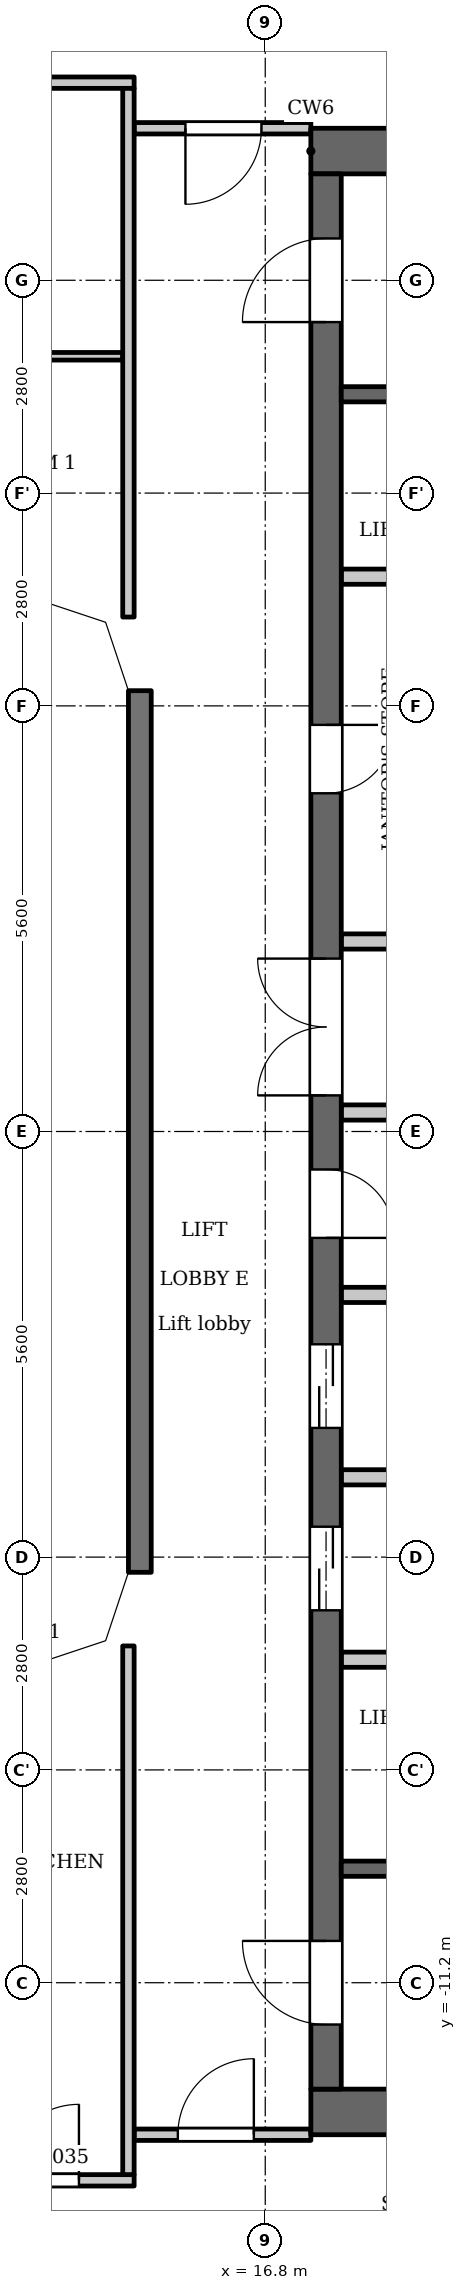
"""IFC4 building model, lengths in metres.
Left out: names, types, materials, properties, quantities, classifications, styles, units other than length and angle.
Written with IfcOpenShell. Run it as: python <this file> out.ifc"""

import sys

from ifc_helpers import new_model, si_unit, direction, frame, frame_2d, origin, place, context, subcontext, project, spatial, polyline, rectangle, outline, extrude, element, fill, save


model = new_model("IFC4")
c1 = context("Model", 3, precision=1e-05, world=origin(), true_north=direction((0.0, 1.0)))
c2 = subcontext(c1, "Body", "Model", "MODEL_VIEW")
j1 = project(units=[si_unit("LENGTHUNIT", "METRE"), si_unit("PLANEANGLEUNIT", "RADIAN")], contexts=[c1])
p1 = place(None, origin())
s1 = spatial("IfcSite", under=j1, at=p1, CompositionType="ELEMENT")
p2 = place(p1, origin())
s2 = spatial("IfcBuilding", under=s1, at=p2, CompositionType="ELEMENT")
p3 = place(p2, frame((0.0, 0.0, 280.2)))
s3 = spatial("IfcBuildingStorey", under=s2, at=p3, CompositionType="ELEMENT", Elevation=280.2)
p4 = place(p3, frame((15.15, 5.8, 0.0), z_axis=(0.0, 0.0, 1.0), x_axis=(0.0, -1.0, 0.0)))
e1 = element("IfcWall", 1, at=p4, inside=s3, PredefinedType="SOLIDWALL", context=c2, shape_type="SweptSolid", body=[
    extrude(rectangle(XDim=11.6, YDim=0.3, at=frame_2d((5.8, 0.0))), origin(), (0.0, 0.0, 1.0), 3.15),
])
for number, where, z_axis, x_axis in (
    (2, (17.4, 12.9, 0.0), (0.0, 0.0, 1.0), (1.0, 0.0, 0.0)),
    (3, (17.4, -12.9, 0.0), (0.0, 0.0, 1.0), (1.0, 0.0, 0.0)),
):
    element("IfcWall", number, at=place(p3, frame(where, z_axis=z_axis, x_axis=x_axis)), inside=s3, PredefinedType="SHEAR", context=c2, shape_type="SweptSolid", body=[
        extrude(rectangle(XDim=7.32, YDim=0.6, at=frame_2d((3.66, 0.0))), origin(), (0.0, 0.0, 1.0), 3.15),
    ])
p5 = place(p3, frame((17.6, -12.6, 0.0), z_axis=(0.0, 0.0, 1.0), x_axis=(0.0, 1.0, 0.0)))
e4 = element("IfcWall", 4, at=p5, inside=s3, PredefinedType="SHEAR", context=c2, shape_type="SweptSolid", body=[
    extrude(rectangle(XDim=25.2, YDim=0.4, at=frame_2d((12.6, 0.0))), origin(), (0.0, 0.0, 1.0), 3.15),
])
p6 = place(p5, frame((6.3, 0.0, 0.0)))
e5 = element("IfcOpeningElement", 5, at=p6, cuts=e4, PredefinedType="OPENING", context=c2, shape_type="SweptSolid", body=[
    extrude(rectangle(XDim=1.1, YDim=2.1, at=frame_2d((0.55, 1.05))), frame((0.0, 0.21, 0.0), z_axis=(0.0, -1.0, 0.0), x_axis=(1.0, 0.0, 0.0)), (0.0, 0.0, 1.0), 0.42),
])
p7 = place(p5, frame((8.7, 0.0, 0.0)))
e6 = element("IfcOpeningElement", 6, at=p7, cuts=e4, PredefinedType="OPENING", context=c2, shape_type="SweptSolid", body=[
    extrude(rectangle(XDim=1.1, YDim=2.1, at=frame_2d((0.55, 1.05))), frame((0.0, 0.21, 0.0), z_axis=(0.0, -1.0, 0.0), x_axis=(1.0, 0.0, 0.0)), (0.0, 0.0, 1.0), 0.42),
])
p8 = place(p5, frame((11.2, 0.0, 0.0)))
e7 = element("IfcOpeningElement", 7, at=p8, cuts=e4, PredefinedType="OPENING", context=c2, shape_type="SweptSolid", body=[
    extrude(rectangle(XDim=0.9, YDim=2.1, at=frame_2d((0.45, 1.05))), frame((0.0, 0.21, 0.0), z_axis=(0.0, -1.0, 0.0), x_axis=(1.0, 0.0, 0.0)), (0.0, 0.0, 1.0), 0.42),
])
p9 = place(p5, frame((17.05, 0.0, 0.0)))
e8 = element("IfcOpeningElement", 8, at=p9, cuts=e4, PredefinedType="OPENING", context=c2, shape_type="SweptSolid", body=[
    extrude(rectangle(XDim=0.9, YDim=2.1, at=frame_2d((0.45, 1.05))), frame((0.0, 0.21, 0.0), z_axis=(0.0, -1.0, 0.0), x_axis=(1.0, 0.0, 0.0)), (0.0, 0.0, 1.0), 0.42),
])
p10 = place(p5, frame((23.25, 0.0, 0.0)))
e9 = element("IfcOpeningElement", 9, at=p10, cuts=e4, PredefinedType="OPENING", context=c2, shape_type="SweptSolid", body=[
    extrude(rectangle(XDim=1.1, YDim=2.1, at=frame_2d((0.55, 1.05))), frame((0.0, 0.21, 0.0), z_axis=(0.0, -1.0, 0.0), x_axis=(1.0, 0.0, 0.0)), (0.0, 0.0, 1.0), 0.42),
])
p11 = place(p5, frame((0.85, 0.0, 0.0)))
e10 = element("IfcOpeningElement", 10, at=p11, cuts=e4, PredefinedType="OPENING", context=c2, shape_type="SweptSolid", body=[
    extrude(rectangle(XDim=1.1, YDim=2.1, at=frame_2d((0.55, 1.05))), frame((0.0, 0.21, 0.0), z_axis=(0.0, -1.0, 0.0), x_axis=(1.0, 0.0, 0.0)), (0.0, 0.0, 1.0), 0.42),
])
p12 = place(p5, frame((13.075, 0.0, 0.0)))
e11 = element("IfcOpeningElement", 11, at=p12, cuts=e4, PredefinedType="OPENING", context=c2, shape_type="SweptSolid", body=[
    extrude(rectangle(XDim=1.8, YDim=2.1, at=frame_2d((0.9, 1.05))), frame((0.0, 0.21, 0.0), z_axis=(0.0, -1.0, 0.0), x_axis=(1.0, 0.0, 0.0)), (0.0, 0.0, 1.0), 0.42),
])
p13 = place(p3, frame((17.8, -9.7, 0.0), z_axis=(0.0, 0.0, 1.0), x_axis=(1.0, 0.0, 0.0)))
e12 = element("IfcWall", 12, at=p13, inside=s3, PredefinedType="SHEAR", context=c2, shape_type="SweptSolid", body=[
    extrude(rectangle(XDim=5.8, YDim=0.2, at=frame_2d((2.9, 0.0))), origin(), (0.0, 0.0, 1.0), 3.15),
])
p14 = place(p13, frame((0.85, 0.0, 0.0)))
e13 = element("IfcOpeningElement", 13, at=p14, cuts=e12, PredefinedType="OPENING", context=c2, shape_type="SweptSolid", body=[
    extrude(rectangle(XDim=1.1, YDim=2.1, at=frame_2d((0.55, 1.05))), frame((0.0, 0.11, 0.0), z_axis=(0.0, -1.0, 0.0), x_axis=(1.0, 0.0, 0.0)), (0.0, 0.0, 1.0), 0.22),
])
p15 = place(p13, frame((3.75, 0.0, 0.0)))
e14 = element("IfcOpeningElement", 14, at=p15, cuts=e12, PredefinedType="OPENING", context=c2, shape_type="SweptSolid", body=[
    extrude(rectangle(XDim=1.1, YDim=2.1, at=frame_2d((0.55, 1.05))), frame((0.0, 0.11, 0.0), z_axis=(0.0, -1.0, 0.0), x_axis=(1.0, 0.0, 0.0)), (0.0, 0.0, 1.0), 0.22),
])
for number, where, z_axis, x_axis in (
    (15, (17.8, -6.95, 0.0), (0.0, 0.0, 1.0), (1.0, 0.0, 0.0)),
    (16, (17.8, -4.55, 0.0), (0.0, 0.0, 1.0), (1.0, 0.0, 0.0)),
    (17, (17.8, -2.15, 0.0), (0.0, 0.0, 1.0), (1.0, 0.0, 0.0)),
):
    element("IfcWall", number, at=place(p3, frame(where, z_axis=z_axis, x_axis=x_axis)), inside=s3, PredefinedType="PARTITIONING", context=c2, shape_type="SweptSolid", body=[
        extrude(rectangle(XDim=2.8, YDim=0.2, at=frame_2d((1.4, 0.0))), origin(), (0.0, 0.0, 1.0), 3.15),
    ])
p16 = place(p3, frame((17.8, 0.25, 0.0), z_axis=(0.0, 0.0, 1.0), x_axis=(1.0, 0.0, 0.0)))
e18 = element("IfcWall", 18, at=p16, inside=s3, PredefinedType="PARTITIONING", context=c2, shape_type="SweptSolid", body=[
    extrude(rectangle(XDim=3.0, YDim=0.2, at=frame_2d((1.5, 0.0))), origin(), (0.0, 0.0, 1.0), 3.15),
])
p17 = place(p3, frame((17.8, 2.5, 0.0), z_axis=(0.0, 0.0, 1.0), x_axis=(1.0, 0.0, 0.0)))
e19 = element("IfcWall", 19, at=p17, inside=s3, PredefinedType="PARTITIONING", context=c2, shape_type="SweptSolid", body=[
    extrude(rectangle(XDim=3.0, YDim=0.2, at=frame_2d((1.5, 0.0))), origin(), (0.0, 0.0, 1.0), 3.15),
])
p18 = place(p17, frame((1.7, 0.0, 0.0)))
e20 = element("IfcOpeningElement", 20, at=p18, cuts=e19, PredefinedType="OPENING", context=c2, shape_type="SweptSolid", body=[
    extrude(rectangle(XDim=0.9, YDim=2.1, at=frame_2d((0.45, 1.05))), frame((0.0, 0.11, 0.0), z_axis=(0.0, -1.0, 0.0), x_axis=(1.0, 0.0, 0.0)), (0.0, 0.0, 1.0), 0.22),
])
p19 = place(p3, frame((17.8, 7.3, 0.0), z_axis=(0.0, 0.0, 1.0), x_axis=(1.0, 0.0, 0.0)))
e21 = element("IfcWall", 21, at=p19, inside=s3, PredefinedType="PARTITIONING", context=c2, shape_type="SweptSolid", body=[
    extrude(rectangle(XDim=2.8, YDim=0.2, at=frame_2d((1.4, 0.0))), origin(), (0.0, 0.0, 1.0), 3.15),
])
p20 = place(p3, frame((17.8, 9.7, 0.0), z_axis=(0.0, 0.0, 1.0), x_axis=(1.0, 0.0, 0.0)))
e22 = element("IfcWall", 22, at=p20, inside=s3, PredefinedType="SHEAR", context=c2, shape_type="SweptSolid", body=[
    extrude(rectangle(XDim=5.8, YDim=0.2, at=frame_2d((2.9, 0.0))), origin(), (0.0, 0.0, 1.0), 3.15),
])
p21 = place(p20, frame((0.85, 0.0, 0.0)))
e23 = element("IfcOpeningElement", 23, at=p21, cuts=e22, PredefinedType="OPENING", context=c2, shape_type="SweptSolid", body=[
    extrude(rectangle(XDim=1.1, YDim=2.1, at=frame_2d((0.55, 1.05))), frame((0.0, 0.11, 0.0), z_axis=(0.0, -1.0, 0.0), x_axis=(1.0, 0.0, 0.0)), (0.0, 0.0, 1.0), 0.22),
])
p22 = place(p20, frame((3.75, 0.0, 0.0)))
e24 = element("IfcOpeningElement", 24, at=p22, cuts=e22, PredefinedType="OPENING", context=c2, shape_type="SweptSolid", body=[
    extrude(rectangle(XDim=1.1, YDim=2.1, at=frame_2d((0.55, 1.05))), frame((0.0, 0.11, 0.0), z_axis=(0.0, -1.0, 0.0), x_axis=(1.0, 0.0, 0.0)), (0.0, 0.0, 1.0), 0.22),
])
p23 = place(p3, frame((-15.075, -13.8, 0.0), z_axis=(0.0, 0.0, 1.0), x_axis=(1.0, 0.0, 0.0)))
e25 = element("IfcWall", 25, at=p23, inside=s3, PredefinedType="PARTITIONING", context=c2, shape_type="SweptSolid", body=[
    extrude(rectangle(XDim=30.15, YDim=0.15, at=frame_2d((15.075, 0.0))), origin(), (0.0, 0.0, 1.0), 3.15),
])
p24 = place(p23, frame((0.725, 0.0, 0.0)))
e26 = element("IfcOpeningElement", 26, at=p24, cuts=e25, PredefinedType="OPENING", context=c2, shape_type="SweptSolid", body=[
    extrude(rectangle(XDim=1.0, YDim=2.1, at=frame_2d((0.5, 1.05))), frame((0.0, 0.085, 0.0), z_axis=(0.0, -1.0, 0.0), x_axis=(1.0, 0.0, 0.0)), (0.0, 0.0, 1.0), 0.17),
])
p25 = place(p23, frame((7.825, 0.0, 0.0)))
e27 = element("IfcOpeningElement", 27, at=p25, cuts=e25, PredefinedType="OPENING", context=c2, shape_type="SweptSolid", body=[
    extrude(rectangle(XDim=1.0, YDim=2.1, at=frame_2d((0.5, 1.05))), frame((0.0, 0.085, 0.0), z_axis=(0.0, -1.0, 0.0), x_axis=(1.0, 0.0, 0.0)), (0.0, 0.0, 1.0), 0.17),
])
p26 = place(p23, frame((10.175, 0.0, 0.0)))
e28 = element("IfcOpeningElement", 28, at=p26, cuts=e25, PredefinedType="OPENING", context=c2, shape_type="SweptSolid", body=[
    extrude(rectangle(XDim=1.0, YDim=2.1, at=frame_2d((0.5, 1.05))), frame((0.0, 0.085, 0.0), z_axis=(0.0, -1.0, 0.0), x_axis=(1.0, 0.0, 0.0)), (0.0, 0.0, 1.0), 0.17),
])
p27 = place(p23, frame((19.025, 0.0, 0.0)))
e29 = element("IfcOpeningElement", 29, at=p27, cuts=e25, PredefinedType="OPENING", context=c2, shape_type="SweptSolid", body=[
    extrude(rectangle(XDim=1.0, YDim=2.1, at=frame_2d((0.5, 1.05))), frame((0.0, 0.085, 0.0), z_axis=(0.0, -1.0, 0.0), x_axis=(1.0, 0.0, 0.0)), (0.0, 0.0, 1.0), 0.17),
])
p28 = place(p23, frame((21.375, 0.0, 0.0)))
e30 = element("IfcOpeningElement", 30, at=p28, cuts=e25, PredefinedType="OPENING", context=c2, shape_type="SweptSolid", body=[
    extrude(rectangle(XDim=1.0, YDim=2.1, at=frame_2d((0.5, 1.05))), frame((0.0, 0.085, 0.0), z_axis=(0.0, -1.0, 0.0), x_axis=(1.0, 0.0, 0.0)), (0.0, 0.0, 1.0), 0.17),
])
p29 = place(p23, frame((28.424, 0.0, 0.0)))
e31 = element("IfcOpeningElement", 31, at=p29, cuts=e25, PredefinedType="OPENING", context=c2, shape_type="SweptSolid", body=[
    extrude(rectangle(XDim=1.0, YDim=2.1, at=frame_2d((0.5, 1.05))), frame((0.0, 0.085, 0.0), z_axis=(0.0, -1.0, 0.0), x_axis=(1.0, 0.0, 0.0)), (0.0, 0.0, 1.0), 0.17),
])
p30 = place(p3, frame((15.075, -13.2, 0.0), z_axis=(0.0, 0.0, 1.0), x_axis=(1.0, 0.0, 0.0)))
e32 = element("IfcWall", 32, at=p30, inside=s3, PredefinedType="PARTITIONING", context=c2, shape_type="SweptSolid", body=[
    extrude(rectangle(XDim=2.325, YDim=0.15, at=frame_2d((1.163, 0.0))), origin(), (0.0, 0.0, 1.0), 3.15),
])
p31 = place(p30, frame((0.575, 0.0, 0.0)))
e33 = element("IfcOpeningElement", 33, at=p31, cuts=e32, PredefinedType="OPENING", context=c2, shape_type="SweptSolid", body=[
    extrude(rectangle(XDim=1.0, YDim=2.1, at=frame_2d((0.5, 1.05))), frame((0.0, 0.085, 0.0), z_axis=(0.0, -1.0, 0.0), x_axis=(1.0, 0.0, 0.0)), (0.0, 0.0, 1.0), 0.17),
])
p32 = place(p3, frame((-14.925, 10.2, 0.0), z_axis=(0.0, 0.0, 1.0), x_axis=(1.0, 0.0, 0.0)))
e34 = element("IfcWall", 34, at=p32, inside=s3, PredefinedType="PARTITIONING", context=c2, shape_type="SweptSolid", body=[
    extrude(rectangle(XDim=29.85, YDim=0.1, at=frame_2d((14.925, 0.0))), origin(), (0.0, 0.0, 1.0), 3.15),
])
p33 = place(p32, frame((4.375, 0.0, 0.0)))
e35 = element("IfcOpeningElement", 35, at=p33, cuts=e34, PredefinedType="OPENING", context=c2, shape_type="SweptSolid", body=[
    extrude(rectangle(XDim=0.8, YDim=2.1, at=frame_2d((0.4, 1.05))), frame((0.0, 0.06, 0.0), z_axis=(0.0, -1.0, 0.0), x_axis=(1.0, 0.0, 0.0)), (0.0, 0.0, 1.0), 0.12),
])
p34 = place(p32, frame((0.576, 0.0, 0.0)))
e36 = element("IfcOpeningElement", 36, at=p34, cuts=e34, PredefinedType="OPENING", context=c2, shape_type="SweptSolid", body=[
    extrude(rectangle(XDim=0.9, YDim=2.1, at=frame_2d((0.45, 1.05))), frame((0.0, 0.06, 0.0), z_axis=(0.0, -1.0, 0.0), x_axis=(1.0, 0.0, 0.0)), (0.0, 0.0, 1.0), 0.12),
])
p35 = place(p32, frame((10.875, 0.0, 0.0)))
e37 = element("IfcOpeningElement", 37, at=p35, cuts=e34, PredefinedType="OPENING", context=c2, shape_type="SweptSolid", body=[
    extrude(rectangle(XDim=0.8, YDim=2.1, at=frame_2d((0.4, 1.05))), frame((0.0, 0.06, 0.0), z_axis=(0.0, -1.0, 0.0), x_axis=(1.0, 0.0, 0.0)), (0.0, 0.0, 1.0), 0.12),
])
p36 = place(p32, frame((12.725, 0.0, 0.0)))
e38 = element("IfcOpeningElement", 38, at=p36, cuts=e34, PredefinedType="OPENING", context=c2, shape_type="SweptSolid", body=[
    extrude(rectangle(XDim=0.9, YDim=2.1, at=frame_2d((0.45, 1.05))), frame((0.0, 0.06, 0.0), z_axis=(0.0, -1.0, 0.0), x_axis=(1.0, 0.0, 0.0)), (0.0, 0.0, 1.0), 0.12),
])
p37 = place(p32, frame((16.075, 0.0, 0.0)))
e39 = element("IfcOpeningElement", 39, at=p37, cuts=e34, PredefinedType="OPENING", context=c2, shape_type="SweptSolid", body=[
    extrude(rectangle(XDim=0.9, YDim=2.1, at=frame_2d((0.45, 1.05))), frame((0.0, 0.06, 0.0), z_axis=(0.0, -1.0, 0.0), x_axis=(1.0, 0.0, 0.0)), (0.0, 0.0, 1.0), 0.12),
])
p38 = place(p32, frame((18.925, 0.0, 0.0)))
e40 = element("IfcOpeningElement", 40, at=p38, cuts=e34, PredefinedType="OPENING", context=c2, shape_type="SweptSolid", body=[
    extrude(rectangle(XDim=0.9, YDim=2.1, at=frame_2d((0.45, 1.05))), frame((0.0, 0.06, 0.0), z_axis=(0.0, -1.0, 0.0), x_axis=(1.0, 0.0, 0.0)), (0.0, 0.0, 1.0), 0.12),
])
p39 = place(p32, frame((26.724, 0.0, 0.0)))
e41 = element("IfcOpeningElement", 41, at=p39, cuts=e34, PredefinedType="OPENING", context=c2, shape_type="SweptSolid", body=[
    extrude(rectangle(XDim=0.8, YDim=2.1, at=frame_2d((0.4, 1.05))), frame((0.0, 0.06, 0.0), z_axis=(0.0, -1.0, 0.0), x_axis=(1.0, 0.0, 0.0)), (0.0, 0.0, 1.0), 0.12),
])
p40 = place(p32, frame((21.175, 0.0, 0.0)))
e42 = element("IfcOpeningElement", 42, at=p40, cuts=e34, PredefinedType="OPENING", context=c2, shape_type="SweptSolid", body=[
    extrude(rectangle(XDim=0.9, YDim=2.1, at=frame_2d((0.45, 1.05))), frame((0.0, 0.06, 0.0), z_axis=(0.0, -1.0, 0.0), x_axis=(1.0, 0.0, 0.0)), (0.0, 0.0, 1.0), 0.12),
])
p41 = place(p3, frame((15.075, 13.2, 0.0), z_axis=(0.0, 0.0, 1.0), x_axis=(1.0, 0.0, 0.0)))
e43 = element("IfcWall", 43, at=p41, inside=s3, PredefinedType="PARTITIONING", context=c2, shape_type="SweptSolid", body=[
    extrude(rectangle(XDim=2.325, YDim=0.15, at=frame_2d((1.163, 0.0))), origin(), (0.0, 0.0, 1.0), 3.15),
])
p42 = place(p41, frame((0.675, 0.0, 0.0)))
e44 = element("IfcOpeningElement", 44, at=p42, cuts=e43, PredefinedType="OPENING", context=c2, shape_type="SweptSolid", body=[
    extrude(rectangle(XDim=1.0, YDim=2.1, at=frame_2d((0.5, 1.05))), frame((0.0, 0.085, 0.0), z_axis=(0.0, -1.0, 0.0), x_axis=(1.0, 0.0, 0.0)), (0.0, 0.0, 1.0), 0.17),
])
p43 = place(p3, frame((-15.075, 13.8, 0.0), z_axis=(0.0, 0.0, 1.0), x_axis=(1.0, 0.0, 0.0)))
e45 = element("IfcWall", 45, at=p43, inside=s3, PredefinedType="PARTITIONING", context=c2, shape_type="SweptSolid", body=[
    extrude(rectangle(XDim=30.15, YDim=0.15, at=frame_2d((15.075, 0.0))), origin(), (0.0, 0.0, 1.0), 3.15),
])
p44 = place(p43, frame((0.726, 0.0, 0.0)))
e46 = element("IfcOpeningElement", 46, at=p44, cuts=e45, PredefinedType="OPENING", context=c2, shape_type="SweptSolid", body=[
    extrude(rectangle(XDim=1.0, YDim=2.1, at=frame_2d((0.5, 1.05))), frame((0.0, 0.085, 0.0), z_axis=(0.0, -1.0, 0.0), x_axis=(1.0, 0.0, 0.0)), (0.0, 0.0, 1.0), 0.17),
])
p45 = place(p43, frame((15.725, 0.0, 0.0)))
e47 = element("IfcOpeningElement", 47, at=p45, cuts=e45, PredefinedType="OPENING", context=c2, shape_type="SweptSolid", body=[
    extrude(rectangle(XDim=1.0, YDim=2.1, at=frame_2d((0.5, 1.05))), frame((0.0, 0.085, 0.0), z_axis=(0.0, -1.0, 0.0), x_axis=(1.0, 0.0, 0.0)), (0.0, 0.0, 1.0), 0.17),
])
p46 = place(p43, frame((21.325, 0.0, 0.0)))
e48 = element("IfcOpeningElement", 48, at=p46, cuts=e45, PredefinedType="OPENING", context=c2, shape_type="SweptSolid", body=[
    extrude(rectangle(XDim=1.0, YDim=2.1, at=frame_2d((0.5, 1.05))), frame((0.0, 0.085, 0.0), z_axis=(0.0, -1.0, 0.0), x_axis=(1.0, 0.0, 0.0)), (0.0, 0.0, 1.0), 0.17),
])
for number, where, z_axis, x_axis in (
    (49, (15.0, -13.725, 0.0), (0.0, 0.0, 1.0), (0.0, 1.0, 0.0)),
    (50, (15.0, 6.769, 0.0), (0.0, 0.0, 1.0), (0.0, 1.0, 0.0)),
):
    element("IfcWall", number, at=place(p3, frame(where, z_axis=z_axis, x_axis=x_axis)), inside=s3, PredefinedType="PARTITIONING", context=c2, shape_type="SweptSolid", body=[
        extrude(rectangle(XDim=6.956, YDim=0.15, at=frame_2d((3.478, 0.0))), origin(), (0.0, 0.0, 1.0), 3.15),
    ])
p47 = place(p3, origin())
e51 = element("IfcWall", 51, at=p47, inside=s3, PredefinedType="SOLIDWALL", context=c2, shape_type="SweptSolid", body=[
    extrude(outline(polyline([(14.937, 6.937), (13.849, 7.3), (13.8, 7.3), (13.8, 7.0), (14.7, 6.7), (15.0, 5.8), (15.3, 5.8), (15.3, 5.849), (14.937, 6.937)])), origin(), (0.0, 0.0, 1.0), 3.15),
])
e52 = element("IfcWall", 52, at=p47, inside=s3, PredefinedType="SOLIDWALL", context=c2, shape_type="SweptSolid", body=[
    extrude(outline(polyline([(14.937, -6.937), (15.3, -5.849), (15.3, -5.8), (15.0, -5.8), (14.7, -6.7), (13.8, -7.0), (13.8, -7.3), (13.849, -7.3), (14.937, -6.937)])), origin(), (0.0, 0.0, 1.0), 3.15),
])
p48 = place(p6, origin())
e53 = element("IfcDoor", 53, at=p48, inside=s3, OperationType="DOUBLE_DOOR_SLIDING", PredefinedType="DOOR", context=c2, shape_type="SweptSolid", body=[
    extrude(rectangle(XDim=1.1, YDim=2.1, at=frame_2d((0.55, 1.05))), frame((0.0, 0.025, 0.0), z_axis=(0.0, -1.0, 0.0), x_axis=(1.0, 0.0, 0.0)), (0.0, 0.0, 1.0), 0.05),
])
fill(e5, e53)
p49 = place(p7, origin())
e54 = element("IfcDoor", 54, at=p49, inside=s3, OperationType="DOUBLE_DOOR_SLIDING", PredefinedType="DOOR", context=c2, shape_type="SweptSolid", body=[
    extrude(rectangle(XDim=1.1, YDim=2.1, at=frame_2d((0.55, 1.05))), frame((0.0, 0.025, 0.0), z_axis=(0.0, -1.0, 0.0), x_axis=(1.0, 0.0, 0.0)), (0.0, 0.0, 1.0), 0.05),
])
fill(e6, e54)
p50 = place(p8, origin())
e55 = element("IfcDoor", 55, at=p50, inside=s3, OperationType="SINGLE_SWING_LEFT", PredefinedType="DOOR", context=c2, shape_type="SweptSolid", body=[
    extrude(rectangle(XDim=0.9, YDim=2.1, at=frame_2d((0.45, 1.05))), frame((0.0, 0.025, 0.0), z_axis=(0.0, -1.0, 0.0), x_axis=(1.0, 0.0, 0.0)), (0.0, 0.0, 1.0), 0.05),
])
fill(e7, e55)
p51 = place(p9, origin())
e56 = element("IfcDoor", 56, at=p51, inside=s3, OperationType="SINGLE_SWING_RIGHT", PredefinedType="DOOR", context=c2, shape_type="SweptSolid", body=[
    extrude(rectangle(XDim=0.9, YDim=2.1, at=frame_2d((0.45, 1.05))), frame((0.0, 0.025, 0.0), z_axis=(0.0, -1.0, 0.0), x_axis=(1.0, 0.0, 0.0)), (0.0, 0.0, 1.0), 0.05),
])
fill(e8, e56)
p52 = place(p10, origin())
e57 = element("IfcDoor", 57, at=p52, inside=s3, OperationType="SINGLE_SWING_RIGHT", PredefinedType="DOOR", context=c2, shape_type="SweptSolid", body=[
    extrude(rectangle(XDim=1.1, YDim=2.1, at=frame_2d((0.55, 1.05))), frame((0.0, 0.025, 0.0), z_axis=(0.0, -1.0, 0.0), x_axis=(1.0, 0.0, 0.0)), (0.0, 0.0, 1.0), 0.05),
])
fill(e9, e57)
p53 = place(p11, origin())
e58 = element("IfcDoor", 58, at=p53, inside=s3, OperationType="SINGLE_SWING_LEFT", PredefinedType="DOOR", context=c2, shape_type="SweptSolid", body=[
    extrude(rectangle(XDim=1.1, YDim=2.1, at=frame_2d((0.55, 1.05))), frame((0.0, 0.025, 0.0), z_axis=(0.0, -1.0, 0.0), x_axis=(1.0, 0.0, 0.0)), (0.0, 0.0, 1.0), 0.05),
])
fill(e10, e58)
p54 = place(p12, origin())
e59 = element("IfcDoor", 59, at=p54, inside=s3, OperationType="DOUBLE_DOOR_SINGLE_SWING", PredefinedType="DOOR", context=c2, shape_type="SweptSolid", body=[
    extrude(rectangle(XDim=1.8, YDim=2.1, at=frame_2d((0.9, 1.05))), frame((0.0, 0.025, 0.0), z_axis=(0.0, -1.0, 0.0), x_axis=(1.0, 0.0, 0.0)), (0.0, 0.0, 1.0), 0.05),
])
fill(e11, e59)
p55 = place(p42, origin())
e60 = element("IfcDoor", 60, at=p55, inside=s3, OperationType="SINGLE_SWING_LEFT", PredefinedType="DOOR", context=c2, shape_type="SweptSolid", body=[
    extrude(rectangle(XDim=1.0, YDim=2.1, at=frame_2d((0.5, 1.05))), frame((0.0, 0.025, 0.0), z_axis=(0.0, -1.0, 0.0), x_axis=(1.0, 0.0, 0.0)), (0.0, 0.0, 1.0), 0.05),
])
fill(e44, e60)
p56 = place(p31, origin())
e61 = element("IfcDoor", 61, at=p56, inside=s3, OperationType="SINGLE_SWING_LEFT", PredefinedType="DOOR", context=c2, shape_type="SweptSolid", body=[
    extrude(rectangle(XDim=1.0, YDim=2.1, at=frame_2d((0.5, 1.05))), frame((0.0, 0.025, 0.0), z_axis=(0.0, -1.0, 0.0), x_axis=(1.0, 0.0, 0.0)), (0.0, 0.0, 1.0), 0.05),
])
fill(e33, e61)
p57 = place(p29, origin())
e62 = element("IfcDoor", 62, at=p57, inside=s3, OperationType="SINGLE_SWING_LEFT", PredefinedType="DOOR", context=c2, shape_type="SweptSolid", body=[
    extrude(rectangle(XDim=1.0, YDim=2.1, at=frame_2d((0.5, 1.05))), frame((0.0, 0.025, 0.0), z_axis=(0.0, -1.0, 0.0), x_axis=(1.0, 0.0, 0.0)), (0.0, 0.0, 1.0), 0.05),
])
fill(e31, e62)
save(model, sys.argv[1])
